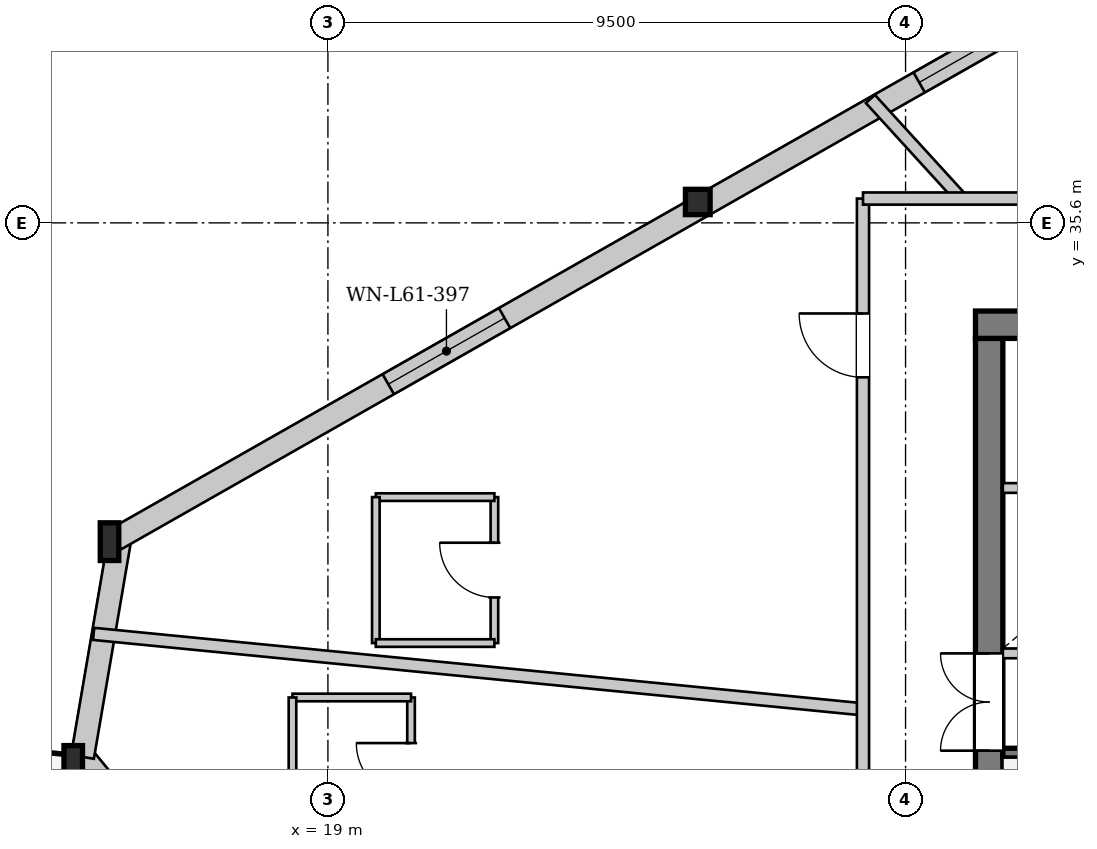
"""IFC4 building model, lengths in metres.
Left out: names, types, materials, properties, quantities, classifications, styles, units other than length and angle.
Written with IfcOpenShell. Run it as: python <this file> out.ifc"""

import sys

from ifc_helpers import new_model, si_unit, direction, frame, frame_2d, origin, origin_2d, place, context, subcontext, project, spatial, rectangle, i_section, extrude, source, transform, mapped, element, fill, save


model = new_model("IFC4")
c1 = context("Model", 3, precision=1e-05, world=origin(), true_north=direction((0.0, 1.0)))
c2 = subcontext(c1, "Body", "Model", "MODEL_VIEW")
j1 = project(units=[si_unit("LENGTHUNIT", "METRE"), si_unit("PLANEANGLEUNIT", "RADIAN")], contexts=[c1])
p1 = place(None, origin())
s1 = spatial("IfcSite", under=j1, at=p1, CompositionType="ELEMENT")
p2 = place(p1, origin())
s2 = spatial("IfcBuilding", under=s1, at=p2, CompositionType="ELEMENT")
p3 = place(p2, frame((0.0, 0.0, 230.9)))
s3 = spatial("IfcBuildingStorey", under=s2, at=p3, CompositionType="ELEMENT", Elevation=230.9)
m1 = source(origin(), c2, "Body", "SweptSolid", [
    extrude(i_section(OverallWidth=0.406, OverallDepth=0.416, WebThickness=0.027, FlangeThickness=0.042, at=origin_2d()), origin(), (0.0, 0.0, 1.0), 3.448),
])
p4 = place(p3, frame((25.134, 36.087, 0.0), z_axis=(-0.02966278613, -0.08339561351, 0.996074942344), x_axis=(0.942175412149, -0.335120116885, 0.0)))
e1 = element("IfcColumn", 1, at=p4, inside=s3, PredefinedType="COLUMN", context=c2, shape_type="MappedRepresentation", body=[
    mapped(m1, transform((0.0, 0.0, 0.0), x_axis=(1.0, 0.0, 0.0), y_axis=(0.0, 1.0, 0.0), z_axis=(0.0, 0.0, 1.0), scale=1.0)),
])
m2 = source(origin(), c2, "Body", "SweptSolid", [
    extrude(i_section(OverallWidth=0.305, OverallDepth=0.62, WebThickness=0.021, FlangeThickness=0.04, at=origin_2d()), origin(), (0.0, 0.0, 1.0), 3.459),
])
p5 = place(p3, frame((15.41, 30.561, 0.0), z_axis=(-0.001199851642, -0.117656040432, 0.99305368259), x_axis=(0.999948004857, -0.010197430164, 0.0)))
e2 = element("IfcColumn", 2, at=p5, inside=s3, PredefinedType="COLUMN", context=c2, shape_type="MappedRepresentation", body=[
    mapped(m2, transform((0.0, 0.0, 0.0), x_axis=(1.0, 0.0, 0.0), y_axis=(0.0, 1.0, 0.0), z_axis=(0.0, 0.0, 1.0), scale=1.0)),
])
m3 = source(origin(), c2, "Body", "SweptSolid", [
    extrude(i_section(OverallWidth=0.305, OverallDepth=0.62, WebThickness=0.021, FlangeThickness=0.04, at=origin_2d()), origin(), (0.0, 0.0, 1.0), 3.45),
])
p6 = place(p3, frame((14.776, 26.85, 0.0), z_axis=(0.020451142237, -0.090720983904, 0.995666336611), x_axis=(0.975520046372, 0.219910525274, 0.0)))
e3 = element("IfcColumn", 3, at=p6, inside=s3, PredefinedType="COLUMN", context=c2, shape_type="MappedRepresentation", body=[
    mapped(m3, transform((0.0, 0.0, 0.0), x_axis=(1.0, 0.0, 0.0), y_axis=(0.0, 1.0, 0.0), z_axis=(0.0, 0.0, 1.0), scale=1.0)),
])
p7 = place(p3, frame((26.093, 13.376, 0.0), z_axis=(0.0, 0.0, 1.0), x_axis=(-0.636168686104, 0.771550000208, 0.0)))
e4 = element("IfcWall", 4, at=p7, inside=s3, PredefinedType="SOLIDWALL", context=c2, shape_type="SweptSolid", body=[
    extrude(rectangle(XDim=17.595, YDim=0.32, at=frame_2d((8.798, 0.0))), origin(), (0.0, 0.0, 1.0), 2.872),
])
p8 = place(p7, frame((4.88, 0.0, 0.0)))
e5 = element("IfcOpeningElement", 5, at=p8, cuts=e4, PredefinedType="OPENING", context=c2, shape_type="SweptSolid", body=[
    extrude(rectangle(XDim=1.5, YDim=2.3, at=frame_2d((0.75, 1.15))), frame((0.0, 0.17, 0.0), z_axis=(0.0, -1.0, 0.0), x_axis=(1.0, 0.0, 0.0)), (0.0, 0.0, 1.0), 0.34),
])
p9 = place(p7, frame((11.721, 0.0, 0.402)))
e6 = element("IfcOpeningElement", 6, at=p9, cuts=e4, PredefinedType="OPENING", context=c2, shape_type="SweptSolid", body=[
    extrude(rectangle(XDim=2.6, YDim=2.35, at=frame_2d((1.3, 1.175))), frame((0.0, 0.17, 0.0), z_axis=(0.0, -1.0, 0.0), x_axis=(1.0, 0.0, 0.0)), (0.0, 0.0, 1.0), 0.34),
])
p10 = place(p3, frame((14.963, 26.818, 0.0), z_axis=(0.0, 0.0, 1.0), x_axis=(0.168425569437, 0.985714374228, 0.0)))
e7 = element("IfcWall", 7, at=p10, inside=s3, PredefinedType="SOLIDWALL", context=c2, shape_type="SweptSolid", body=[
    extrude(rectangle(XDim=3.764, YDim=0.38, at=frame_2d((1.882, 0.0))), origin(), (0.0, 0.0, 1.0), 2.872),
])
p11 = place(p3, frame((15.504, 30.396, 0.0), z_axis=(0.0, 0.0, 1.0), x_axis=(0.869398698509, 0.494111225365, 0.0)))
e8 = element("IfcWall", 8, at=p11, inside=s3, PredefinedType="SOLIDWALL", context=c2, shape_type="SweptSolid", body=[
    extrude(rectangle(XDim=22.369, YDim=0.38, at=frame_2d((11.185, 0.0))), origin(), (0.0, 0.0, 1.0), 2.872),
])
p12 = place(p11, frame((5.163, 0.0, 0.502)))
e9 = element("IfcOpeningElement", 9, at=p12, cuts=e8, PredefinedType="OPENING", context=c2, shape_type="SweptSolid", body=[
    extrude(rectangle(XDim=2.2, YDim=2.25, at=frame_2d((1.1, 1.125))), frame((0.0, 0.2, 0.0), z_axis=(0.0, -1.0, 0.0), x_axis=(1.0, 0.0, 0.0)), (0.0, 0.0, 1.0), 0.4),
])
p13 = place(p11, frame((15.206, 0.0, 0.502)))
e10 = element("IfcOpeningElement", 10, at=p13, cuts=e8, PredefinedType="OPENING", context=c2, shape_type="SweptSolid", body=[
    extrude(rectangle(XDim=2.2, YDim=2.25, at=frame_2d((1.1, 1.125))), frame((0.0, 0.2, 0.0), z_axis=(0.0, -1.0, 0.0), x_axis=(1.0, 0.0, 0.0)), (0.0, 0.0, 1.0), 0.4),
])
p14 = place(p3, frame((29.875, 19.5, 0.0), z_axis=(0.0, 0.0, 1.0), x_axis=(0.0, 1.0, 0.0)))
e11 = element("IfcWall", 11, at=p14, inside=s3, PredefinedType="SHEAR", context=c2, shape_type="SweptSolid", body=[
    extrude(rectangle(XDim=14.2, YDim=0.45, at=frame_2d((7.1, 0.0))), origin(), (0.0, 0.0, 1.0), 3.38),
])
p15 = place(p14, frame((7.42, 0.0, 0.0)))
e12 = element("IfcOpeningElement", 12, at=p15, cuts=e11, PredefinedType="OPENING", context=c2, shape_type="SweptSolid", body=[
    extrude(rectangle(XDim=1.6, YDim=2.2, at=frame_2d((0.8, 1.1))), frame((0.0, 0.235, 0.0), z_axis=(0.0, -1.0, 0.0), x_axis=(1.0, 0.0, 0.0)), (0.0, 0.0, 1.0), 0.47),
])
p16 = place(p3, frame((29.65, 33.925, 0.0), z_axis=(0.0, 0.0, 1.0), x_axis=(1.0, 0.0, 0.0)))
e13 = element("IfcWall", 13, at=p16, inside=s3, PredefinedType="SHEAR", context=c2, shape_type="SweptSolid", body=[
    extrude(rectangle(XDim=16.7, YDim=0.45, at=frame_2d((8.35, 0.0))), origin(), (0.0, 0.0, 1.0), 3.38),
])
p17 = place(p16, frame((1.45, 0.0, 0.0)))
e14 = element("IfcOpeningElement", 14, at=p17, cuts=e13, PredefinedType="OPENING", context=c2, shape_type="SweptSolid", body=[
    extrude(rectangle(XDim=0.95, YDim=2.1, at=frame_2d((0.475, 1.05))), frame((0.0, 0.235, 0.0), z_axis=(0.0, -1.0, 0.0), x_axis=(1.0, 0.0, 0.0)), (0.0, 0.0, 1.0), 0.47),
])
p18 = place(p16, frame((3.83, 0.0, 0.0)))
e15 = element("IfcOpeningElement", 15, at=p18, cuts=e13, PredefinedType="OPENING", context=c2, shape_type="SweptSolid", body=[
    extrude(rectangle(XDim=1.32, YDim=2.2, at=frame_2d((0.66, 1.1))), frame((0.0, 0.235, 0.0), z_axis=(0.0, -1.0, 0.0), x_axis=(1.0, 0.0, 0.0)), (0.0, 0.0, 1.0), 0.47),
])
for number, where, z_axis, x_axis in (
    (16, (30.1, 26.88, 0.0), (0.0, 0.0, 1.0), (1.0, 0.0, 0.0)),
    (17, (30.1, 28.52, 0.0), (0.0, 0.0, 1.0), (1.0, 0.0, 0.0)),
):
    element("IfcWall", number, at=place(p3, frame(where, z_axis=z_axis, x_axis=x_axis)), inside=s3, PredefinedType="PARTITIONING", context=c2, shape_type="SweptSolid", body=[
        extrude(rectangle(XDim=3.02, YDim=0.16, at=frame_2d((1.51, 0.0))), origin(), (0.0, 0.0, 1.0), 3.38),
    ])
p19 = place(p3, frame((30.1, 31.24, 0.0), z_axis=(0.0, 0.0, 1.0), x_axis=(1.0, 0.0, 0.0)))
e18 = element("IfcWall", 18, at=p19, inside=s3, PredefinedType="PARTITIONING", context=c2, shape_type="SweptSolid", body=[
    extrude(rectangle(XDim=3.02, YDim=0.16, at=frame_2d((1.51, 0.0))), origin(), (0.0, 0.0, 1.0), 3.38),
])
p20 = place(p19, frame((0.91, 0.0, 0.0)))
e19 = element("IfcOpeningElement", 19, at=p20, cuts=e18, PredefinedType="OPENING", context=c2, shape_type="SweptSolid", body=[
    extrude(rectangle(XDim=1.2, YDim=2.2, at=frame_2d((0.6, 1.1))), frame((0.0, 0.09, 0.0), z_axis=(0.0, -1.0, 0.0), x_axis=(1.0, 0.0, 0.0)), (0.0, 0.0, 1.0), 0.18),
])
p21 = place(p3, frame((29.417, 36.0, 0.0), z_axis=(0.0, 0.0, 1.0), x_axis=(-0.67428241759, 0.738473575241, 0.0)))
e20 = element("IfcWall", 20, at=p21, inside=s3, PredefinedType="PARTITIONING", context=c2, shape_type="SweptSolid", body=[
    extrude(rectangle(XDim=2.217, YDim=0.2, at=frame_2d((1.109, 0.0))), origin(), (0.0, 0.0, 1.0), 3.38),
])
p22 = place(p3, frame((27.8, 27.6, 0.0), z_axis=(0.0, 0.0, 1.0), x_axis=(-0.995227172247, 0.097585222353, 0.0)))
e21 = element("IfcWall", 21, at=p22, inside=s3, PredefinedType="PARTITIONING", context=c2, shape_type="SweptSolid", body=[
    extrude(rectangle(XDim=12.714, YDim=0.2, at=frame_2d((6.357, 0.0))), origin(), (0.0, 0.0, 1.0), 3.38),
])
p23 = place(p3, frame((21.738, 28.69, 0.0), z_axis=(0.0, 0.0, 1.0), x_axis=(0.0, 1.0, 0.0)))
e22 = element("IfcWall", 22, at=p23, inside=s3, PredefinedType="PARTITIONING", context=c2, shape_type="SweptSolid", body=[
    extrude(rectangle(XDim=2.4, YDim=0.125, at=frame_2d((1.2, 0.0))), origin(), (0.0, 0.0, 1.0), 3.38),
])
p24 = place(p23, frame((0.75, 0.0, 0.0)))
e23 = element("IfcOpeningElement", 23, at=p24, cuts=e22, PredefinedType="OPENING", context=c2, shape_type="SweptSolid", body=[
    extrude(rectangle(XDim=0.9, YDim=2.1, at=frame_2d((0.45, 1.05))), frame((0.0, 0.073, 0.0), z_axis=(0.0, -1.0, 0.0), x_axis=(1.0, 0.0, 0.0)), (0.0, 0.0, 1.0), 0.145),
])
p25 = place(p3, frame((21.738, 31.09, 0.0), z_axis=(0.0, 0.0, 1.0), x_axis=(-1.0, 0.0, 0.0)))
e24 = element("IfcWall", 24, at=p25, inside=s3, PredefinedType="PARTITIONING", context=c2, shape_type="SweptSolid", body=[
    extrude(rectangle(XDim=1.95, YDim=0.125, at=frame_2d((0.975, 0.0))), origin(), (0.0, 0.0, 1.0), 3.38),
])
p26 = place(p3, frame((19.788, 31.09, 0.0), z_axis=(0.0, 0.0, 1.0), x_axis=(0.0, -1.0, 0.0)))
e25 = element("IfcWall", 25, at=p26, inside=s3, PredefinedType="PARTITIONING", context=c2, shape_type="SweptSolid", body=[
    extrude(rectangle(XDim=2.4, YDim=0.125, at=frame_2d((1.2, 0.0))), origin(), (0.0, 0.0, 1.0), 3.38),
])
p27 = place(p3, frame((19.788, 28.69, 0.0), z_axis=(0.0, 0.0, 1.0), x_axis=(1.0, 0.0, 0.0)))
e26 = element("IfcWall", 26, at=p27, inside=s3, PredefinedType="PARTITIONING", context=c2, shape_type="SweptSolid", body=[
    extrude(rectangle(XDim=1.95, YDim=0.125, at=frame_2d((0.975, 0.0))), origin(), (0.0, 0.0, 1.0), 3.38),
])
p28 = place(p3, frame((20.367, 25.395, 0.0), z_axis=(0.0, 0.0, 1.0), x_axis=(0.0, 1.0, 0.0)))
e27 = element("IfcWall", 27, at=p28, inside=s3, PredefinedType="PARTITIONING", context=c2, shape_type="SweptSolid", body=[
    extrude(rectangle(XDim=2.4, YDim=0.125, at=frame_2d((1.2, 0.0))), origin(), (0.0, 0.0, 1.0), 3.38),
])
p29 = place(p28, frame((0.75, 0.0, 0.0)))
e28 = element("IfcOpeningElement", 28, at=p29, cuts=e27, PredefinedType="OPENING", context=c2, shape_type="SweptSolid", body=[
    extrude(rectangle(XDim=0.9, YDim=2.1, at=frame_2d((0.45, 1.05))), frame((0.0, 0.073, 0.0), z_axis=(0.0, -1.0, 0.0), x_axis=(1.0, 0.0, 0.0)), (0.0, 0.0, 1.0), 0.145),
])
p30 = place(p3, frame((20.367, 27.795, 0.0), z_axis=(0.0, 0.0, 1.0), x_axis=(-1.0, 0.0, 0.0)))
e29 = element("IfcWall", 29, at=p30, inside=s3, PredefinedType="PARTITIONING", context=c2, shape_type="SweptSolid", body=[
    extrude(rectangle(XDim=1.95, YDim=0.125, at=frame_2d((0.975, 0.0))), origin(), (0.0, 0.0, 1.0), 3.38),
])
p31 = place(p3, frame((18.417, 27.795, 0.0), z_axis=(0.0, 0.0, 1.0), x_axis=(0.0, -1.0, 0.0)))
e30 = element("IfcWall", 30, at=p31, inside=s3, PredefinedType="PARTITIONING", context=c2, shape_type="SweptSolid", body=[
    extrude(rectangle(XDim=2.4, YDim=0.125, at=frame_2d((1.2, 0.0))), origin(), (0.0, 0.0, 1.0), 3.38),
])
p32 = place(p3, frame((27.8, 17.2, 0.0), z_axis=(0.0, 0.0, 1.0), x_axis=(0.0, 1.0, 0.0)))
e31 = element("IfcWall", 31, at=p32, inside=s3, PredefinedType="PARTITIONING", context=c2, shape_type="SweptSolid", body=[
    extrude(rectangle(XDim=18.8, YDim=0.2, at=frame_2d((9.4, 0.0))), origin(), (0.0, 0.0, 1.0), 3.38),
])
p33 = place(p32, frame((15.86, 0.0, 0.0)))
e32 = element("IfcOpeningElement", 32, at=p33, cuts=e31, PredefinedType="OPENING", context=c2, shape_type="SweptSolid", body=[
    extrude(rectangle(XDim=1.05, YDim=2.2, at=frame_2d((0.525, 1.1))), frame((0.0, 0.11, 0.0), z_axis=(0.0, -1.0, 0.0), x_axis=(1.0, 0.0, 0.0)), (0.0, 0.0, 1.0), 0.22),
])
p34 = place(p32, frame((4.436, 0.0, 0.0)))
e33 = element("IfcOpeningElement", 33, at=p34, cuts=e31, PredefinedType="OPENING", context=c2, shape_type="SweptSolid", body=[
    extrude(rectangle(XDim=1.05, YDim=2.2, at=frame_2d((0.525, 1.1))), frame((0.0, 0.11, 0.0), z_axis=(0.0, -1.0, 0.0), x_axis=(1.0, 0.0, 0.0)), (0.0, 0.0, 1.0), 0.22),
])
p35 = place(p3, frame((27.8, 36.0, 0.0), z_axis=(0.0, 0.0, 1.0), x_axis=(1.0, 0.0, 0.0)))
e34 = element("IfcWall", 34, at=p35, inside=s3, PredefinedType="PARTITIONING", context=c2, shape_type="SweptSolid", body=[
    extrude(rectangle(XDim=13.2, YDim=0.2, at=frame_2d((6.6, 0.0))), origin(), (0.0, 0.0, 1.0), 3.38),
])
p36 = place(p35, frame((11.85, 0.0, 0.0)))
e35 = element("IfcOpeningElement", 35, at=p36, cuts=e34, PredefinedType="OPENING", context=c2, shape_type="SweptSolid", body=[
    extrude(rectangle(XDim=1.05, YDim=2.2, at=frame_2d((0.525, 1.1))), frame((0.0, 0.11, 0.0), z_axis=(0.0, -1.0, 0.0), x_axis=(1.0, 0.0, 0.0)), (0.0, 0.0, 1.0), 0.22),
])
p37 = place(p35, frame((5.15, 0.0, 0.0)))
e36 = element("IfcOpeningElement", 36, at=p37, cuts=e34, PredefinedType="OPENING", context=c2, shape_type="SweptSolid", body=[
    extrude(rectangle(XDim=1.05, YDim=2.2, at=frame_2d((0.525, 1.1))), frame((0.0, 0.11, 0.0), z_axis=(0.0, -1.0, 0.0), x_axis=(1.0, 0.0, 0.0)), (0.0, 0.0, 1.0), 0.22),
])
m4 = source(origin(), c2, "Body", "SweptSolid", [
    extrude(rectangle(XDim=2.2, YDim=2.25, at=frame_2d((1.1, 1.125))), frame((0.0, 0.03, 0.0), z_axis=(0.0, -1.0, 0.0), x_axis=(1.0, 0.0, 0.0)), (0.0, 0.0, 1.0), 0.06),
])
p38 = place(p12, origin())
e37 = element("IfcWindow", 37, at=p38, inside=s3, PartitioningType="SINGLE_PANEL", PredefinedType="WINDOW", context=c2, shape_type="MappedRepresentation", body=[
    mapped(m4, transform((0.0, 0.0, 0.0), x_axis=(1.0, 0.0, 0.0), y_axis=(0.0, 1.0, 0.0), z_axis=(0.0, 0.0, 1.0), scale=1.0)),
])
fill(e9, e37)
p39 = place(p13, origin())
e38 = element("IfcWindow", 38, at=p39, inside=s3, PartitioningType="SINGLE_PANEL", PredefinedType="WINDOW", context=c2, shape_type="MappedRepresentation", body=[
    mapped(m4, transform((0.0, 0.0, 0.0), x_axis=(1.0, 0.0, 0.0), y_axis=(0.0, 1.0, 0.0), z_axis=(0.0, 0.0, 1.0), scale=1.0)),
])
fill(e10, e38)
m5 = source(origin(), c2, "Body", "SweptSolid", [
    extrude(rectangle(XDim=1.6, YDim=2.2, at=frame_2d((0.8, 1.1))), frame((0.0, 0.025, 0.0), z_axis=(0.0, -1.0, 0.0), x_axis=(1.0, 0.0, 0.0)), (0.0, 0.0, 1.0), 0.05),
])
p40 = place(p15, origin())
e39 = element("IfcDoor", 39, at=p40, inside=s3, OperationType="DOUBLE_DOOR_SINGLE_SWING", PredefinedType="DOOR", context=c2, shape_type="MappedRepresentation", body=[
    mapped(m5, transform((0.0, 0.0, 0.0), x_axis=(1.0, 0.0, 0.0), y_axis=(0.0, 1.0, 0.0), z_axis=(0.0, 0.0, 1.0), scale=1.0)),
])
fill(e12, e39)
m6 = source(origin(), c2, "Body", "SweptSolid", [
    extrude(rectangle(XDim=0.9, YDim=2.1, at=frame_2d((0.45, 1.05))), frame((0.0, 0.025, 0.0), z_axis=(0.0, -1.0, 0.0), x_axis=(1.0, 0.0, 0.0)), (0.0, 0.0, 1.0), 0.05),
])
p41 = place(p24, origin())
e40 = element("IfcDoor", 40, at=p41, inside=s3, OperationType="SINGLE_SWING_RIGHT", PredefinedType="DOOR", context=c2, shape_type="MappedRepresentation", body=[
    mapped(m6, transform((0.0, 0.0, 0.0), x_axis=(1.0, 0.0, 0.0), y_axis=(0.0, 1.0, 0.0), z_axis=(0.0, 0.0, 1.0), scale=1.0)),
])
fill(e23, e40)
p42 = place(p29, origin())
e41 = element("IfcDoor", 41, at=p42, inside=s3, OperationType="SINGLE_SWING_RIGHT", PredefinedType="DOOR", context=c2, shape_type="MappedRepresentation", body=[
    mapped(m6, transform((0.0, 0.0, 0.0), x_axis=(1.0, 0.0, 0.0), y_axis=(0.0, 1.0, 0.0), z_axis=(0.0, 0.0, 1.0), scale=1.0)),
])
fill(e28, e41)
m7 = source(origin(), c2, "Body", "SweptSolid", [
    extrude(rectangle(XDim=1.05, YDim=2.2, at=frame_2d((0.525, 1.1))), frame((0.0, 0.025, 0.0), z_axis=(0.0, -1.0, 0.0), x_axis=(1.0, 0.0, 0.0)), (0.0, 0.0, 1.0), 0.05),
])
p43 = place(p33, origin())
e42 = element("IfcDoor", 42, at=p43, inside=s3, OperationType="SINGLE_SWING_RIGHT", PredefinedType="DOOR", context=c2, shape_type="MappedRepresentation", body=[
    mapped(m7, transform((0.0, 0.0, 0.0), x_axis=(1.0, 0.0, 0.0), y_axis=(0.0, 1.0, 0.0), z_axis=(0.0, 0.0, 1.0), scale=1.0)),
])
fill(e32, e42)
save(model, sys.argv[1])
